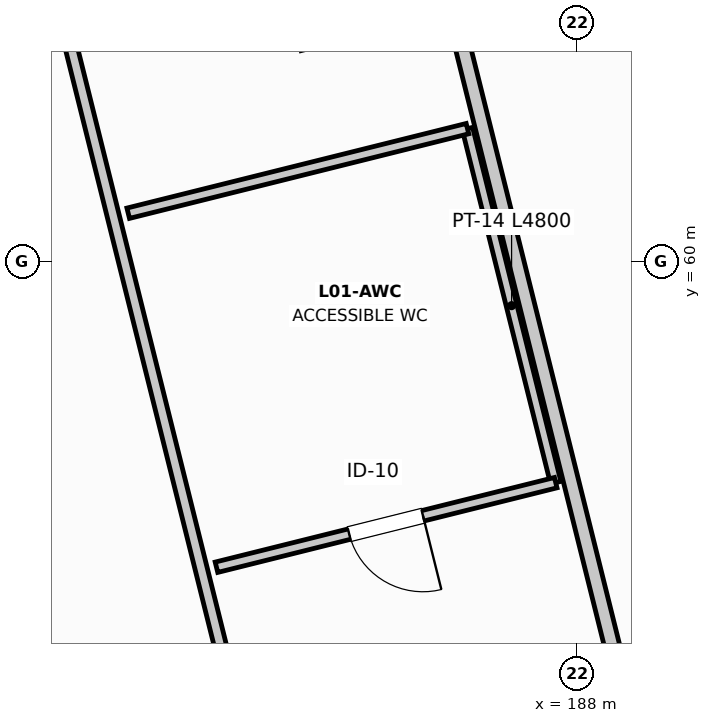
"""IFC4 building model, lengths in metres.
Left out: names, types, materials, properties, quantities, classifications, styles, units other than length and angle.
Written with IfcOpenShell. Run it as: python <this file> out.ifc"""

import sys

from ifc_helpers import new_model, si_unit, direction, frame, frame_2d, origin, place, context, subcontext, project, spatial, rectangle, extrude, element, fill, save


model = new_model("IFC4")
c1 = context("Model", 3, precision=1e-05, world=origin(), true_north=direction((0.0, 1.0)))
c2 = subcontext(c1, "Body", "Model", "MODEL_VIEW")
j1 = project(units=[si_unit("LENGTHUNIT", "METRE"), si_unit("PLANEANGLEUNIT", "RADIAN")], contexts=[c1])
p1 = place(None, origin())
s1 = spatial("IfcSite", under=j1, at=p1, CompositionType="ELEMENT")
p2 = place(p1, origin())
s2 = spatial("IfcBuilding", under=s1, at=p2, CompositionType="ELEMENT")
p3 = place(p2, frame((0.0, 0.0, 6.0)))
s3 = spatial("IfcBuildingStorey", under=s2, at=p3, CompositionType="ELEMENT", Elevation=6.0)
p4 = place(p3, frame((178.899, 72.618, 0.0), z_axis=(0.0, 0.0, 1.0), x_axis=(0.241919657827, -0.970296284213, 0.0)))
e1 = element("IfcWall", 1, at=p4, inside=s3, PredefinedType="PARTITIONING", context=c2, shape_type="SweptSolid", body=[
    extrude(rectangle(XDim=27.2, YDim=0.16, at=frame_2d((13.6, 0.0))), origin(), (0.0, 0.0, 1.0), 4.435),
])
p5 = place(p4, frame((20.358, 0.0, 0.0)))
e2 = element("IfcOpeningElement", 2, at=p5, cuts=e1, PredefinedType="OPENING", context=c2, shape_type="SweptSolid", body=[
    extrude(rectangle(XDim=1.1, YDim=2.2, at=frame_2d((0.55, 1.1))), frame((0.0, 0.09, 0.0), z_axis=(0.0, -1.0, 0.0), x_axis=(1.0, 0.0, 0.0)), (0.0, 0.0, 1.0), 0.18),
])
p6 = place(p3, frame((186.556, 61.748, 0.0), z_axis=(0.0, 0.0, 1.0), x_axis=(0.241917925609, -0.970296716097, 0.0)))
e3 = element("IfcWall", 3, at=p6, inside=s3, PredefinedType="PARTITIONING", context=c2, shape_type="SweptSolid", body=[
    extrude(rectangle(XDim=4.8, YDim=0.14, at=frame_2d((2.4, 0.0))), origin(), (0.0, 0.0, 1.0), 4.635),
])
p7 = place(p3, frame((187.718, 57.09, 0.0), z_axis=(0.0, 0.0, 1.0), x_axis=(-0.970291933356, -0.241937107663, 0.0)))
e4 = element("IfcWall", 4, at=p7, inside=s3, PredefinedType="PARTITIONING", context=c2, shape_type="SweptSolid", body=[
    extrude(rectangle(XDim=4.6, YDim=0.14, at=frame_2d((2.3, 0.0))), origin(), (0.0, 0.0, 1.0), 4.395),
])
p8 = place(p7, frame((1.8, 0.0, 0.0)))
e5 = element("IfcOpeningElement", 5, at=p8, cuts=e4, PredefinedType="OPENING", context=c2, shape_type="SweptSolid", body=[
    extrude(rectangle(XDim=1.0, YDim=2.15, at=frame_2d((0.5, 1.075))), frame((0.0, 0.08, 0.0), z_axis=(0.0, -1.0, 0.0), x_axis=(1.0, 0.0, 0.0)), (0.0, 0.0, 1.0), 0.16),
])
p9 = place(p3, frame((182.093, 60.635, 0.0), z_axis=(0.0, 0.0, 1.0), x_axis=(0.970291933356, 0.241937107663, 0.0)))
e6 = element("IfcWall", 6, at=p9, inside=s3, PredefinedType="PARTITIONING", context=c2, shape_type="SweptSolid", body=[
    extrude(rectangle(XDim=4.6, YDim=0.14, at=frame_2d((2.3, 0.0))), origin(), (0.0, 0.0, 1.0), 4.395),
])
p10 = place(p3, frame((190.345, 47.377, 0.0), z_axis=(0.0, 0.0, 1.0), x_axis=(-0.241921879243, 0.970295730354, 0.0)))
e7 = element("IfcWall", 7, at=p10, inside=s3, PredefinedType="PARTITIONING", context=c2, shape_type="SweptSolid", body=[
    extrude(rectangle(XDim=27.26, YDim=0.2, at=frame_2d((13.63, 0.0))), origin(), (0.0, 0.0, 1.0), 3.785),
])
p11 = place(p10, frame((3.924, 0.0, 0.0)))
e8 = element("IfcOpeningElement", 8, at=p11, cuts=e7, PredefinedType="OPENING", context=c2, shape_type="SweptSolid", body=[
    extrude(rectangle(XDim=1.1, YDim=2.2, at=frame_2d((0.55, 1.1))), frame((0.0, 0.11, 0.0), z_axis=(0.0, -1.0, 0.0), x_axis=(1.0, 0.0, 0.0)), (0.0, 0.0, 1.0), 0.22),
])
p12 = place(p8, origin())
e9 = element("IfcDoor", 9, at=p12, inside=s3, OperationType="SINGLE_SWING_LEFT", PredefinedType="DOOR", context=c2, shape_type="SweptSolid", body=[
    extrude(rectangle(XDim=1.0, YDim=2.15, at=frame_2d((0.5, 1.075))), frame((0.0, 0.025, 0.0), z_axis=(0.0, -1.0, 0.0), x_axis=(1.0, 0.0, 0.0)), (0.0, 0.0, 1.0), 0.05),
])
fill(e5, e9)
save(model, sys.argv[1])
